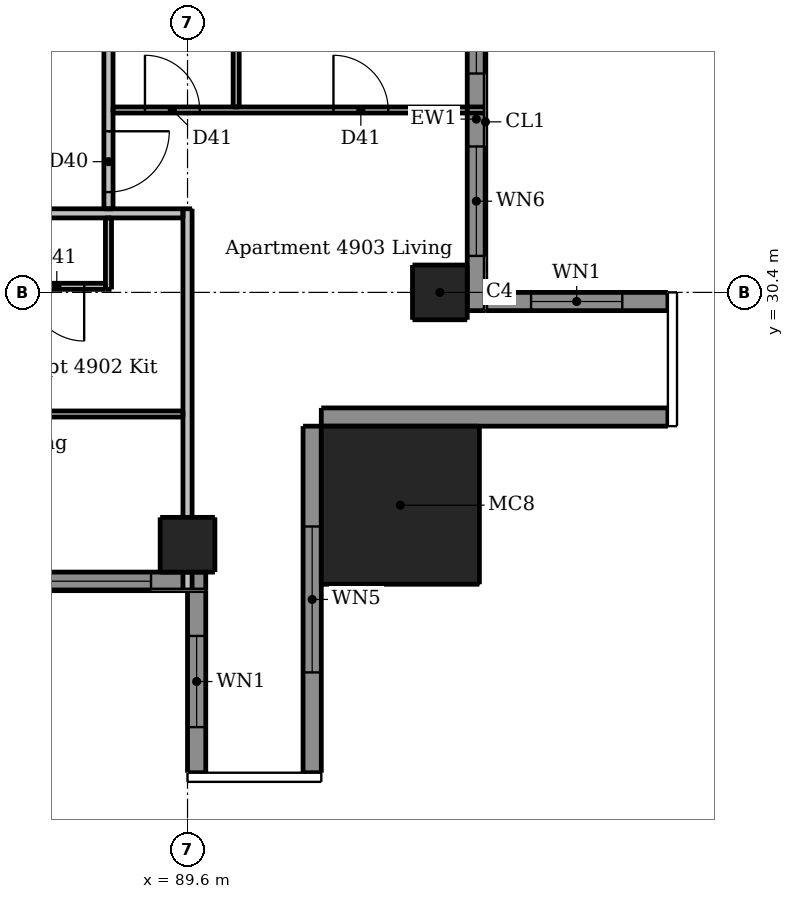
"""IFC4 building model, lengths in metres.
Left out: names, types, materials, properties, quantities, classifications, styles, units other than length and angle.
Written with IfcOpenShell. Run it as: python <this file> out.ifc"""

import sys

from ifc_helpers import new_model, si_unit, direction, frame, frame_2d, origin, origin_2d, place, context, subcontext, project, spatial, rectangle, extrude, element, fill, save


model = new_model("IFC4")
c1 = context("Model", 3, precision=1e-05, world=origin(), true_north=direction((0.0, 1.0)))
c2 = subcontext(c1, "Body", "Model", "MODEL_VIEW")
j1 = project(units=[si_unit("LENGTHUNIT", "METRE"), si_unit("PLANEANGLEUNIT", "RADIAN")], contexts=[c1])
p1 = place(None, origin())
s1 = spatial("IfcSite", under=j1, at=p1, CompositionType="ELEMENT")
p2 = place(p1, origin())
s2 = spatial("IfcBuilding", under=s1, at=p2, CompositionType="ELEMENT")
p3 = place(p2, frame((0.0, 0.0, 187.0)))
s3 = spatial("IfcBuildingStorey", under=s2, at=p3, CompositionType="ELEMENT", Elevation=187.0)
for number, where, z_axis, x_axis in (
    (1, (89.6, 26.25, 0.0), (0.0, 0.0, 1.0), (1.0, 0.0, 0.0)),
    (2, (93.75, 30.4, 0.0), (0.0, 0.0, 1.0), (1.0, 0.0, 0.0)),
):
    element("IfcColumn", number, at=place(p3, frame(where, z_axis=z_axis, x_axis=x_axis)), inside=s3, PredefinedType="COLUMN", context=c2, shape_type="SweptSolid", body=[
        extrude(rectangle(XDim=0.9, YDim=0.9, at=origin_2d()), origin(), (0.0, 0.0, 1.0), 3.05),
    ])
p4 = place(p3, frame((93.1, 26.9, 0.0), z_axis=(0.0, 0.0, 1.0), x_axis=(1.0, 0.0, 0.0)))
e3 = element("IfcColumn", 3, at=p4, inside=s3, PredefinedType="COLUMN", context=c2, shape_type="SweptSolid", body=[
    extrude(rectangle(XDim=2.6, YDim=2.6, at=origin_2d()), origin(), (0.0, 0.0, 1.0), 3.3),
])
p5 = place(p3, frame((89.75, 25.5, 0.0), z_axis=(0.0, 0.0, 1.0), x_axis=(0.0, -1.0, 0.0)))
e4 = element("IfcWall", 4, at=p5, inside=s3, PredefinedType="SOLIDWALL", context=c2, shape_type="SweptSolid", body=[
    extrude(rectangle(XDim=3.0, YDim=0.3, at=frame_2d((1.5, 0.0))), origin(), (0.0, 0.0, 1.0), 3.05),
])
p6 = place(p5, frame((0.75, 0.0, 0.9)))
e5 = element("IfcOpeningElement", 5, at=p6, cuts=e4, PredefinedType="OPENING", context=c2, shape_type="SweptSolid", body=[
    extrude(rectangle(XDim=1.5, YDim=1.5, at=frame_2d((0.75, 0.75))), frame((0.0, 0.16, 0.0), z_axis=(0.0, -1.0, 0.0), x_axis=(1.0, 0.0, 0.0)), (0.0, 0.0, 1.0), 0.32),
])
p7 = place(p3, frame((91.65, 22.5, 0.0), z_axis=(0.0, 0.0, 1.0), x_axis=(0.0, 1.0, 0.0)))
e6 = element("IfcWall", 6, at=p7, inside=s3, PredefinedType="SOLIDWALL", context=c2, shape_type="SweptSolid", body=[
    extrude(rectangle(XDim=5.7, YDim=0.3, at=frame_2d((2.85, 0.0))), origin(), (0.0, 0.0, 1.0), 3.05),
])
p8 = place(p7, frame((1.65, 0.0, 0.15)))
e7 = element("IfcOpeningElement", 7, at=p8, cuts=e6, PredefinedType="OPENING", context=c2, shape_type="SweptSolid", body=[
    extrude(rectangle(XDim=2.4, YDim=2.1, at=frame_2d((1.2, 1.05))), frame((0.0, 0.16, 0.0), z_axis=(0.0, -1.0, 0.0), x_axis=(1.0, 0.0, 0.0)), (0.0, 0.0, 1.0), 0.32),
])
p9 = place(p3, frame((91.8, 28.35, 0.0), z_axis=(0.0, 0.0, 1.0), x_axis=(1.0, 0.0, 0.0)))
e8 = element("IfcWall", 8, at=p9, inside=s3, PredefinedType="SOLIDWALL", context=c2, shape_type="SweptSolid", body=[
    extrude(rectangle(XDim=5.7, YDim=0.3, at=frame_2d((2.85, 0.0))), origin(), (0.0, 0.0, 1.0), 3.05),
])
p10 = place(p3, frame((97.5, 30.25, 0.0), z_axis=(0.0, 0.0, 1.0), x_axis=(-1.0, 0.0, 0.0)))
e9 = element("IfcWall", 9, at=p10, inside=s3, PredefinedType="SOLIDWALL", context=c2, shape_type="SweptSolid", body=[
    extrude(rectangle(XDim=3.0, YDim=0.3, at=frame_2d((1.5, 0.0))), origin(), (0.0, 0.0, 1.0), 3.05),
])
p11 = place(p10, frame((0.75, 0.0, 0.9)))
e10 = element("IfcOpeningElement", 10, at=p11, cuts=e9, PredefinedType="OPENING", context=c2, shape_type="SweptSolid", body=[
    extrude(rectangle(XDim=1.5, YDim=1.5, at=frame_2d((0.75, 0.75))), frame((0.0, 0.16, 0.0), z_axis=(0.0, -1.0, 0.0), x_axis=(1.0, 0.0, 0.0)), (0.0, 0.0, 1.0), 0.32),
])
p12 = place(p3, frame((83.6, 25.65, 0.0), z_axis=(0.0, 0.0, 1.0), x_axis=(1.0, 0.0, 0.0)))
e11 = element("IfcWall", 11, at=p12, inside=s3, PredefinedType="SOLIDWALL", context=c2, shape_type="SweptSolid", body=[
    extrude(rectangle(XDim=6.3, YDim=0.3, at=frame_2d((3.15, 0.0))), origin(), (0.0, 0.0, 1.0), 3.05),
])
p13 = place(p12, frame((0.6, 0.0, 0.15)))
e12 = element("IfcOpeningElement", 12, at=p13, cuts=e11, PredefinedType="OPENING", context=c2, shape_type="SweptSolid", body=[
    extrude(rectangle(XDim=1.8, YDim=2.1, at=frame_2d((0.9, 1.05))), frame((0.0, 0.16, 0.0), z_axis=(0.0, -1.0, 0.0), x_axis=(1.0, 0.0, 0.0)), (0.0, 0.0, 1.0), 0.32),
])
p14 = place(p12, frame((3.6, 0.0, 0.15)))
e13 = element("IfcOpeningElement", 13, at=p14, cuts=e11, PredefinedType="OPENING", context=c2, shape_type="SweptSolid", body=[
    extrude(rectangle(XDim=1.8, YDim=2.1, at=frame_2d((0.9, 1.05))), frame((0.0, 0.16, 0.0), z_axis=(0.0, -1.0, 0.0), x_axis=(1.0, 0.0, 0.0)), (0.0, 0.0, 1.0), 0.32),
])
p15 = place(p3, frame((94.35, 30.1, 0.0), z_axis=(0.0, 0.0, 1.0), x_axis=(0.0, 1.0, 0.0)))
e14 = element("IfcWall", 14, at=p15, inside=s3, PredefinedType="SOLIDWALL", context=c2, shape_type="SweptSolid", body=[
    extrude(rectangle(XDim=6.3, YDim=0.3, at=frame_2d((3.15, 0.0))), origin(), (0.0, 0.0, 1.0), 3.05),
])
p16 = place(p15, frame((0.9, 0.0, 0.15)))
e15 = element("IfcOpeningElement", 15, at=p16, cuts=e14, PredefinedType="OPENING", context=c2, shape_type="SweptSolid", body=[
    extrude(rectangle(XDim=1.8, YDim=2.1, at=frame_2d((0.9, 1.05))), frame((0.0, 0.16, 0.0), z_axis=(0.0, -1.0, 0.0), x_axis=(1.0, 0.0, 0.0)), (0.0, 0.0, 1.0), 0.32),
])
p17 = place(p15, frame((3.9, 0.0, 0.15)))
e16 = element("IfcOpeningElement", 16, at=p17, cuts=e14, PredefinedType="OPENING", context=c2, shape_type="SweptSolid", body=[
    extrude(rectangle(XDim=1.8, YDim=2.1, at=frame_2d((0.9, 1.05))), frame((0.0, 0.16, 0.0), z_axis=(0.0, -1.0, 0.0), x_axis=(1.0, 0.0, 0.0)), (0.0, 0.0, 1.0), 0.32),
])
p18 = place(p3, frame((88.3, 30.45, 0.0), z_axis=(0.0, 0.0, 1.0), x_axis=(0.0, 1.0, 0.0)))
e17 = element("IfcWall", 17, at=p18, inside=s3, PredefinedType="PARTITIONING", context=c2, shape_type="SweptSolid", body=[
    extrude(rectangle(XDim=1.175, YDim=0.1, at=frame_2d((0.587, 0.0))), origin(), (0.0, 0.0, 1.0), 3.05),
])
p19 = place(p3, frame((90.4, 33.45, 0.0), z_axis=(0.0, 0.0, 1.0), x_axis=(0.0, 1.0, 0.0)))
e18 = element("IfcWall", 18, at=p19, inside=s3, PredefinedType="PARTITIONING", context=c2, shape_type="SweptSolid", body=[
    extrude(rectangle(XDim=5.975, YDim=0.1, at=frame_2d((2.988, 0.0))), origin(), (0.0, 0.0, 1.0), 3.05),
])
p20 = place(p19, frame((3.8, 0.0, 0.0)))
e19 = element("IfcOpeningElement", 19, at=p20, cuts=e18, PredefinedType="OPENING", context=c2, shape_type="SweptSolid", body=[
    extrude(rectangle(XDim=0.8, YDim=2.1, at=frame_2d((0.4, 1.05))), frame((0.0, 0.06, 0.0), z_axis=(0.0, -1.0, 0.0), x_axis=(1.0, 0.0, 0.0)), (0.0, 0.0, 1.0), 0.12),
])
p21 = place(p3, frame((88.375, 33.4, 0.0), z_axis=(0.0, 0.0, 1.0), x_axis=(1.0, 0.0, 0.0)))
e20 = element("IfcWall", 20, at=p21, inside=s3, PredefinedType="PARTITIONING", context=c2, shape_type="SweptSolid", body=[
    extrude(rectangle(XDim=6.125, YDim=0.1, at=frame_2d((3.062, 0.0))), origin(), (0.0, 0.0, 1.0), 3.05),
])
p22 = place(p21, frame((0.525, 0.0, 0.0)))
e21 = element("IfcOpeningElement", 21, at=p22, cuts=e20, PredefinedType="OPENING", context=c2, shape_type="SweptSolid", body=[
    extrude(rectangle(XDim=0.9, YDim=2.1, at=frame_2d((0.45, 1.05))), frame((0.0, 0.06, 0.0), z_axis=(0.0, -1.0, 0.0), x_axis=(1.0, 0.0, 0.0)), (0.0, 0.0, 1.0), 0.12),
])
p23 = place(p21, frame((3.625, 0.0, 0.0)))
e22 = element("IfcOpeningElement", 22, at=p23, cuts=e20, PredefinedType="OPENING", context=c2, shape_type="SweptSolid", body=[
    extrude(rectangle(XDim=0.9, YDim=2.1, at=frame_2d((0.45, 1.05))), frame((0.0, 0.06, 0.0), z_axis=(0.0, -1.0, 0.0), x_axis=(1.0, 0.0, 0.0)), (0.0, 0.0, 1.0), 0.12),
])
p24 = place(p3, frame((88.25, 30.5, 0.0), z_axis=(0.0, 0.0, 1.0), x_axis=(-1.0, 0.0, 0.0)))
e23 = element("IfcWall", 23, at=p24, inside=s3, PredefinedType="PARTITIONING", context=c2, shape_type="SweptSolid", body=[
    extrude(rectangle(XDim=16.575, YDim=0.1, at=frame_2d((8.288, 0.0))), origin(), (0.0, 0.0, 1.0), 3.05),
])
p25 = place(p24, frame((4.15, 0.0, 0.0)))
e24 = element("IfcOpeningElement", 24, at=p25, cuts=e23, PredefinedType="OPENING", context=c2, shape_type="SweptSolid", body=[
    extrude(rectangle(XDim=0.9, YDim=2.1, at=frame_2d((0.45, 1.05))), frame((0.0, 0.06, 0.0), z_axis=(0.0, -1.0, 0.0), x_axis=(1.0, 0.0, 0.0)), (0.0, 0.0, 1.0), 0.12),
])
p26 = place(p24, frame((0.35, 0.0, 0.0)))
e25 = element("IfcOpeningElement", 25, at=p26, cuts=e23, PredefinedType="OPENING", context=c2, shape_type="SweptSolid", body=[
    extrude(rectangle(XDim=0.9, YDim=2.1, at=frame_2d((0.45, 1.05))), frame((0.0, 0.06, 0.0), z_axis=(0.0, -1.0, 0.0), x_axis=(1.0, 0.0, 0.0)), (0.0, 0.0, 1.0), 0.12),
])
p27 = place(p24, frame((14.4, 0.0, 0.0)))
e26 = element("IfcOpeningElement", 26, at=p27, cuts=e23, PredefinedType="OPENING", context=c2, shape_type="SweptSolid", body=[
    extrude(rectangle(XDim=0.9, YDim=2.1, at=frame_2d((0.45, 1.05))), frame((0.0, 0.06, 0.0), z_axis=(0.0, -1.0, 0.0), x_axis=(1.0, 0.0, 0.0)), (0.0, 0.0, 1.0), 0.12),
])
p28 = place(p24, frame((8.65, 0.0, 0.0)))
e27 = element("IfcOpeningElement", 27, at=p28, cuts=e23, PredefinedType="OPENING", context=c2, shape_type="SweptSolid", body=[
    extrude(rectangle(XDim=0.9, YDim=2.1, at=frame_2d((0.45, 1.05))), frame((0.0, 0.06, 0.0), z_axis=(0.0, -1.0, 0.0), x_axis=(1.0, 0.0, 0.0)), (0.0, 0.0, 1.0), 0.12),
])
p29 = place(p24, frame((11.45, 0.0, 0.0)))
e28 = element("IfcOpeningElement", 28, at=p29, cuts=e23, PredefinedType="OPENING", context=c2, shape_type="SweptSolid", body=[
    extrude(rectangle(XDim=0.8, YDim=2.1, at=frame_2d((0.4, 1.05))), frame((0.0, 0.06, 0.0), z_axis=(0.0, -1.0, 0.0), x_axis=(1.0, 0.0, 0.0)), (0.0, 0.0, 1.0), 0.12),
])
p30 = place(p3, frame((86.65, 28.4, 0.0), z_axis=(0.0, 0.0, 1.0), x_axis=(1.0, 0.0, 0.0)))
e29 = element("IfcWall", 29, at=p30, inside=s3, PredefinedType="PARTITIONING", context=c2, shape_type="SweptSolid", body=[
    extrude(rectangle(XDim=2.875, YDim=0.1, at=frame_2d((1.438, 0.0))), origin(), (0.0, 0.0, 1.0), 3.05),
])
p31 = place(p3, frame((88.3, 61.175, 0.0), z_axis=(0.0, 0.0, 1.0), x_axis=(0.0, -1.0, 0.0)))
e30 = element("IfcWall", 30, at=p31, inside=s3, PredefinedType="PARTITIONING", context=c2, shape_type="SweptSolid", body=[
    extrude(rectangle(XDim=29.4, YDim=0.15, at=frame_2d((14.7, 0.0))), origin(), (0.0, 0.0, 1.0), 3.05),
])
p32 = place(p31, frame((28.125, 0.0, 0.0)))
e31 = element("IfcOpeningElement", 31, at=p32, cuts=e30, PredefinedType="OPENING", context=c2, shape_type="SweptSolid", body=[
    extrude(rectangle(XDim=1.0, YDim=2.1, at=frame_2d((0.5, 1.05))), frame((0.0, 0.085, 0.0), z_axis=(0.0, -1.0, 0.0), x_axis=(1.0, 0.0, 0.0)), (0.0, 0.0, 1.0), 0.17),
])
p33 = place(p31, frame((10.725, 0.0, 0.0)))
e32 = element("IfcOpeningElement", 32, at=p33, cuts=e30, PredefinedType="OPENING", context=c2, shape_type="SweptSolid", body=[
    extrude(rectangle(XDim=1.0, YDim=2.1, at=frame_2d((0.5, 1.05))), frame((0.0, 0.085, 0.0), z_axis=(0.0, -1.0, 0.0), x_axis=(1.0, 0.0, 0.0)), (0.0, 0.0, 1.0), 0.17),
])
p34 = place(p3, frame((89.6, 25.5, 0.0), z_axis=(0.0, 0.0, 1.0), x_axis=(0.0, 1.0, 0.0)))
e33 = element("IfcWall", 33, at=p34, inside=s3, PredefinedType="PARTITIONING", context=c2, shape_type="SweptSolid", body=[
    extrude(rectangle(XDim=6.275, YDim=0.15, at=frame_2d((3.137, 0.0))), origin(), (0.0, 0.0, 1.0), 2.516),
])
p35 = place(p3, frame((89.525, 31.7, 0.0), z_axis=(0.0, 0.0, 1.0), x_axis=(-1.0, 0.0, 0.0)))
e34 = element("IfcWall", 34, at=p35, inside=s3, PredefinedType="PARTITIONING", context=c2, shape_type="SweptSolid", body=[
    extrude(rectangle(XDim=30.55, YDim=0.15, at=frame_2d((15.275, 0.0))), origin(), (0.0, 0.0, 1.0), 3.05),
])
p36 = place(p35, frame((26.775, 0.0, 0.0)))
e35 = element("IfcOpeningElement", 35, at=p36, cuts=e34, PredefinedType="OPENING", context=c2, shape_type="SweptSolid", body=[
    extrude(rectangle(XDim=1.0, YDim=2.1, at=frame_2d((0.5, 1.05))), frame((0.0, 0.085, 0.0), z_axis=(0.0, -1.0, 0.0), x_axis=(1.0, 0.0, 0.0)), (0.0, 0.0, 1.0), 0.17),
])
p37 = place(p35, frame((9.075, 0.0, 0.0)))
e36 = element("IfcOpeningElement", 36, at=p37, cuts=e34, PredefinedType="OPENING", context=c2, shape_type="SweptSolid", body=[
    extrude(rectangle(XDim=1.0, YDim=2.1, at=frame_2d((0.5, 1.05))), frame((0.0, 0.085, 0.0), z_axis=(0.0, -1.0, 0.0), x_axis=(1.0, 0.0, 0.0)), (0.0, 0.0, 1.0), 0.17),
])
p38 = place(p6, origin())
e37 = element("IfcWindow", 37, at=p38, inside=s3, PartitioningType="DOUBLE_PANEL_VERTICAL", PredefinedType="WINDOW", context=c2, shape_type="SweptSolid", body=[
    extrude(rectangle(XDim=1.5, YDim=1.5, at=frame_2d((0.75, 0.75))), frame((0.0, 0.03, 0.0), z_axis=(0.0, -1.0, 0.0), x_axis=(1.0, 0.0, 0.0)), (0.0, 0.0, 1.0), 0.06),
])
fill(e5, e37)
p39 = place(p8, origin())
e38 = element("IfcWindow", 38, at=p39, inside=s3, PartitioningType="DOUBLE_PANEL_VERTICAL", PredefinedType="WINDOW", context=c2, shape_type="SweptSolid", body=[
    extrude(rectangle(XDim=2.4, YDim=2.1, at=frame_2d((1.2, 1.05))), frame((0.0, 0.03, 0.0), z_axis=(0.0, -1.0, 0.0), x_axis=(1.0, 0.0, 0.0)), (0.0, 0.0, 1.0), 0.06),
])
fill(e7, e38)
p40 = place(p11, origin())
e39 = element("IfcWindow", 39, at=p40, inside=s3, PartitioningType="DOUBLE_PANEL_VERTICAL", PredefinedType="WINDOW", context=c2, shape_type="SweptSolid", body=[
    extrude(rectangle(XDim=1.5, YDim=1.5, at=frame_2d((0.75, 0.75))), frame((0.0, 0.03, 0.0), z_axis=(0.0, -1.0, 0.0), x_axis=(1.0, 0.0, 0.0)), (0.0, 0.0, 1.0), 0.06),
])
fill(e10, e39)
p41 = place(p14, origin())
e40 = element("IfcWindow", 40, at=p41, inside=s3, PartitioningType="DOUBLE_PANEL_VERTICAL", PredefinedType="WINDOW", context=c2, shape_type="SweptSolid", body=[
    extrude(rectangle(XDim=1.8, YDim=2.1, at=frame_2d((0.9, 1.05))), frame((0.0, 0.03, 0.0), z_axis=(0.0, -1.0, 0.0), x_axis=(1.0, 0.0, 0.0)), (0.0, 0.0, 1.0), 0.06),
])
fill(e13, e40)
p42 = place(p16, origin())
e41 = element("IfcWindow", 41, at=p42, inside=s3, PartitioningType="DOUBLE_PANEL_VERTICAL", PredefinedType="WINDOW", context=c2, shape_type="SweptSolid", body=[
    extrude(rectangle(XDim=1.8, YDim=2.1, at=frame_2d((0.9, 1.05))), frame((0.0, 0.03, 0.0), z_axis=(0.0, -1.0, 0.0), x_axis=(1.0, 0.0, 0.0)), (0.0, 0.0, 1.0), 0.06),
])
fill(e15, e41)
p43 = place(p17, origin())
e42 = element("IfcWindow", 42, at=p43, inside=s3, PartitioningType="DOUBLE_PANEL_VERTICAL", PredefinedType="WINDOW", context=c2, shape_type="SweptSolid", body=[
    extrude(rectangle(XDim=1.8, YDim=2.1, at=frame_2d((0.9, 1.05))), frame((0.0, 0.03, 0.0), z_axis=(0.0, -1.0, 0.0), x_axis=(1.0, 0.0, 0.0)), (0.0, 0.0, 1.0), 0.06),
])
fill(e16, e42)
p44 = place(p26, origin())
e43 = element("IfcDoor", 43, at=p44, inside=s3, OperationType="SINGLE_SWING_LEFT", PredefinedType="DOOR", context=c2, shape_type="SweptSolid", body=[
    extrude(rectangle(XDim=0.9, YDim=2.1, at=frame_2d((0.45, 1.05))), frame((0.0, 0.025, 0.0), z_axis=(0.0, -1.0, 0.0), x_axis=(1.0, 0.0, 0.0)), (0.0, 0.0, 1.0), 0.05),
])
fill(e25, e43)
p45 = place(p32, origin())
e44 = element("IfcDoor", 44, at=p45, inside=s3, OperationType="SINGLE_SWING_LEFT", PredefinedType="DOOR", context=c2, shape_type="SweptSolid", body=[
    extrude(rectangle(XDim=1.0, YDim=2.1, at=frame_2d((0.5, 1.05))), frame((0.0, 0.025, 0.0), z_axis=(0.0, -1.0, 0.0), x_axis=(1.0, 0.0, 0.0)), (0.0, 0.0, 1.0), 0.05),
])
fill(e31, e44)
p46 = place(p22, origin())
e45 = element("IfcDoor", 45, at=p46, inside=s3, OperationType="SINGLE_SWING_LEFT", PredefinedType="DOOR", context=c2, shape_type="SweptSolid", body=[
    extrude(rectangle(XDim=0.9, YDim=2.1, at=frame_2d((0.45, 1.05))), frame((0.0, 0.025, 0.0), z_axis=(0.0, -1.0, 0.0), x_axis=(1.0, 0.0, 0.0)), (0.0, 0.0, 1.0), 0.05),
])
fill(e21, e45)
p47 = place(p23, origin())
e46 = element("IfcDoor", 46, at=p47, inside=s3, OperationType="SINGLE_SWING_LEFT", PredefinedType="DOOR", context=c2, shape_type="SweptSolid", body=[
    extrude(rectangle(XDim=0.9, YDim=2.1, at=frame_2d((0.45, 1.05))), frame((0.0, 0.025, 0.0), z_axis=(0.0, -1.0, 0.0), x_axis=(1.0, 0.0, 0.0)), (0.0, 0.0, 1.0), 0.05),
])
fill(e22, e46)
save(model, sys.argv[1])
